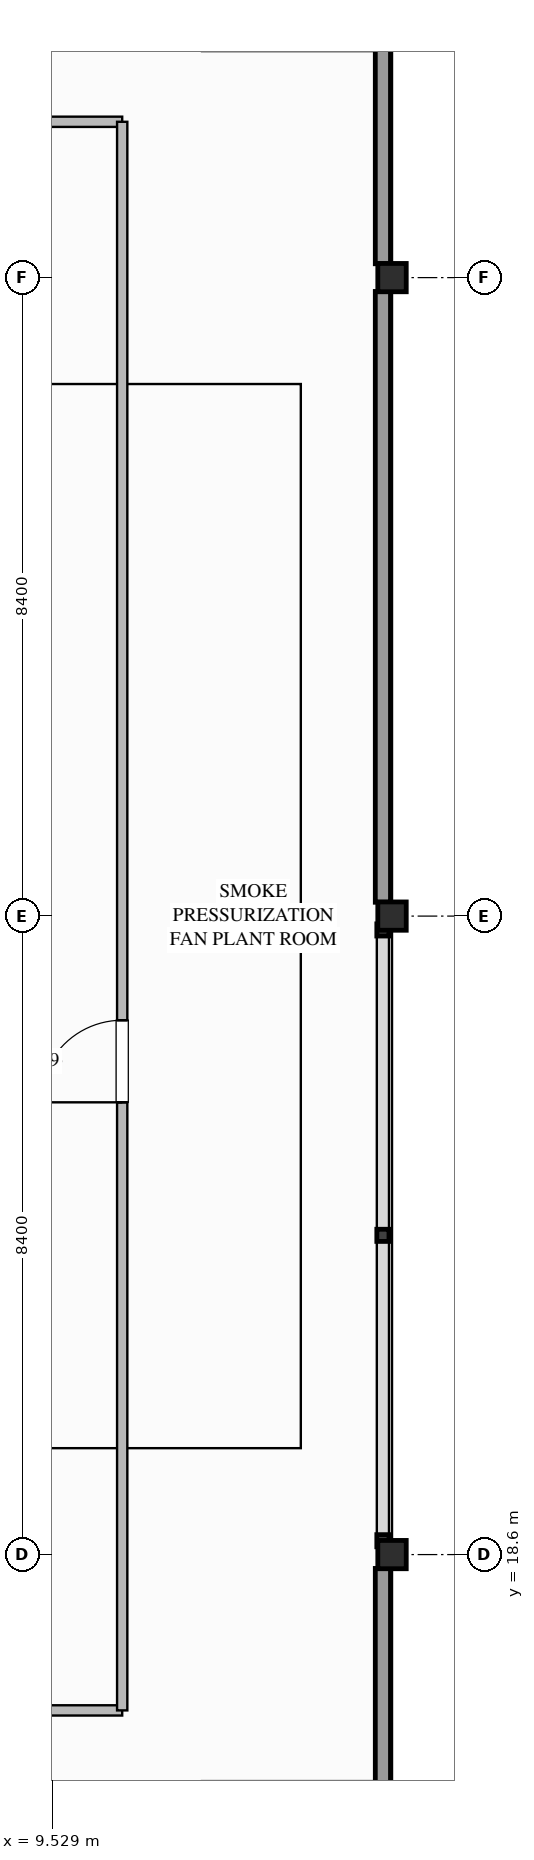
"""IFC4 building model, lengths in metres.
Left out: names, types, materials, properties, quantities, classifications, styles, units other than length and angle.
Written with IfcOpenShell. Run it as: python <this file> out.ifc"""

import sys

from ifc_helpers import new_model, si_unit, direction, frame, frame_2d, origin, origin_2d, place, context, subcontext, project, spatial, rectangle, i_section, extrude, element, fill, save


model = new_model("IFC4")
c1 = context("Model", 3, precision=1e-05, world=origin(), true_north=direction((0.0, 1.0)))
c2 = subcontext(c1, "Body", "Model", "MODEL_VIEW")
j1 = project(units=[si_unit("LENGTHUNIT", "METRE"), si_unit("PLANEANGLEUNIT", "RADIAN")], contexts=[c1])
p1 = place(None, origin())
s1 = spatial("IfcSite", under=j1, at=p1, CompositionType="ELEMENT")
p2 = place(p1, origin())
s2 = spatial("IfcBuilding", under=s1, at=p2, CompositionType="ELEMENT")
p3 = place(p2, frame((0.0, 0.0, 315.4)))
s3 = spatial("IfcBuildingStorey", under=s2, at=p3, CompositionType="ELEMENT", Elevation=315.4)
for number, where, z_axis, x_axis in (
    (1, (14.0, 18.6, 0.0), (0.0, 0.0, 1.0), (1.0, 0.0, 0.0)),
    (2, (14.0, 27.0, 0.0), (0.0, 0.0, 1.0), (1.0, 0.0, 0.0)),
    (3, (14.0, 35.4, 0.0), (0.0, 0.0, 1.0), (1.0, 0.0, 0.0)),
):
    element("IfcColumn", number, at=place(p3, frame(where, z_axis=z_axis, x_axis=x_axis)), inside=s3, PredefinedType="COLUMN", context=c2, shape_type="SweptSolid", body=[
        extrude(i_section(OverallWidth=0.374, OverallDepth=0.372, WebThickness=0.016, FlangeThickness=0.026, FilletRadius=0.025, at=origin_2d()), origin(), (0.0, 0.0, 1.0), 3.997),
    ])
p4 = place(p3, frame((-10.45, 16.55, 0.0), z_axis=(0.0, 0.0, 1.0), x_axis=(1.0, 0.0, 0.0)))
e4 = element("IfcWall", 4, at=p4, inside=s3, PredefinedType="PARTITIONING", context=c2, shape_type="SweptSolid", body=[
    extrude(rectangle(XDim=20.9, YDim=0.135, at=frame_2d((10.45, 0.0))), origin(), (0.0, 0.0, 1.0), 3.68),
])
p5 = place(p4, frame((3.0, 0.0, 0.0)))
e5 = element("IfcOpeningElement", 5, at=p5, cuts=e4, PredefinedType="OPENING", context=c2, shape_type="SweptSolid", body=[
    extrude(rectangle(XDim=1.08, YDim=2.04, at=frame_2d((0.54, 1.02))), frame((0.0, 0.077, 0.0), z_axis=(0.0, -1.0, 0.0), x_axis=(1.0, 0.0, 0.0)), (0.0, 0.0, 1.0), 0.155),
])
p6 = place(p4, frame((15.0, 0.0, 0.0)))
e6 = element("IfcOpeningElement", 6, at=p6, cuts=e4, PredefinedType="OPENING", context=c2, shape_type="SweptSolid", body=[
    extrude(rectangle(XDim=1.08, YDim=2.04, at=frame_2d((0.54, 1.02))), frame((0.0, 0.077, 0.0), z_axis=(0.0, -1.0, 0.0), x_axis=(1.0, 0.0, 0.0)), (0.0, 0.0, 1.0), 0.155),
])
p7 = place(p3, frame((-10.45, 37.45, 0.0), z_axis=(0.0, 0.0, 1.0), x_axis=(1.0, 0.0, 0.0)))
e7 = element("IfcWall", 7, at=p7, inside=s3, PredefinedType="PARTITIONING", context=c2, shape_type="SweptSolid", body=[
    extrude(rectangle(XDim=20.9, YDim=0.135, at=frame_2d((10.45, 0.0))), origin(), (0.0, 0.0, 1.0), 3.68),
])
p8 = place(p7, frame((3.0, 0.0, 0.0)))
e8 = element("IfcOpeningElement", 8, at=p8, cuts=e7, PredefinedType="OPENING", context=c2, shape_type="SweptSolid", body=[
    extrude(rectangle(XDim=1.08, YDim=2.04, at=frame_2d((0.54, 1.02))), frame((0.0, 0.077, 0.0), z_axis=(0.0, -1.0, 0.0), x_axis=(1.0, 0.0, 0.0)), (0.0, 0.0, 1.0), 0.155),
])
p9 = place(p7, frame((15.0, 0.0, 0.0)))
e9 = element("IfcOpeningElement", 9, at=p9, cuts=e7, PredefinedType="OPENING", context=c2, shape_type="SweptSolid", body=[
    extrude(rectangle(XDim=1.08, YDim=2.04, at=frame_2d((0.54, 1.02))), frame((0.0, 0.077, 0.0), z_axis=(0.0, -1.0, 0.0), x_axis=(1.0, 0.0, 0.0)), (0.0, 0.0, 1.0), 0.155),
])
p10 = place(p3, frame((10.45, 16.55, 0.0), z_axis=(0.0, 0.0, 1.0), x_axis=(0.0, 1.0, 0.0)))
e10 = element("IfcWall", 10, at=p10, inside=s3, PredefinedType="PARTITIONING", context=c2, shape_type="SweptSolid", body=[
    extrude(rectangle(XDim=20.9, YDim=0.135, at=frame_2d((10.45, 0.0))), origin(), (0.0, 0.0, 1.0), 3.68),
])
p11 = place(p10, frame((8.0, 0.0, 0.0)))
e11 = element("IfcOpeningElement", 11, at=p11, cuts=e10, PredefinedType="OPENING", context=c2, shape_type="SweptSolid", body=[
    extrude(rectangle(XDim=1.08, YDim=2.04, at=frame_2d((0.54, 1.02))), frame((0.0, 0.077, 0.0), z_axis=(0.0, -1.0, 0.0), x_axis=(1.0, 0.0, 0.0)), (0.0, 0.0, 1.0), 0.155),
])
p12 = place(p11, origin())
e12 = element("IfcDoor", 12, at=p12, inside=s3, OperationType="SINGLE_SWING_LEFT", PredefinedType="DOOR", context=c2, shape_type="SweptSolid", body=[
    extrude(rectangle(XDim=1.08, YDim=2.04, at=frame_2d((0.54, 1.02))), frame((0.0, 0.025, 0.0), z_axis=(0.0, -1.0, 0.0), x_axis=(1.0, 0.0, 0.0)), (0.0, 0.0, 1.0), 0.05),
])
fill(e11, e12)
save(model, sys.argv[1])
